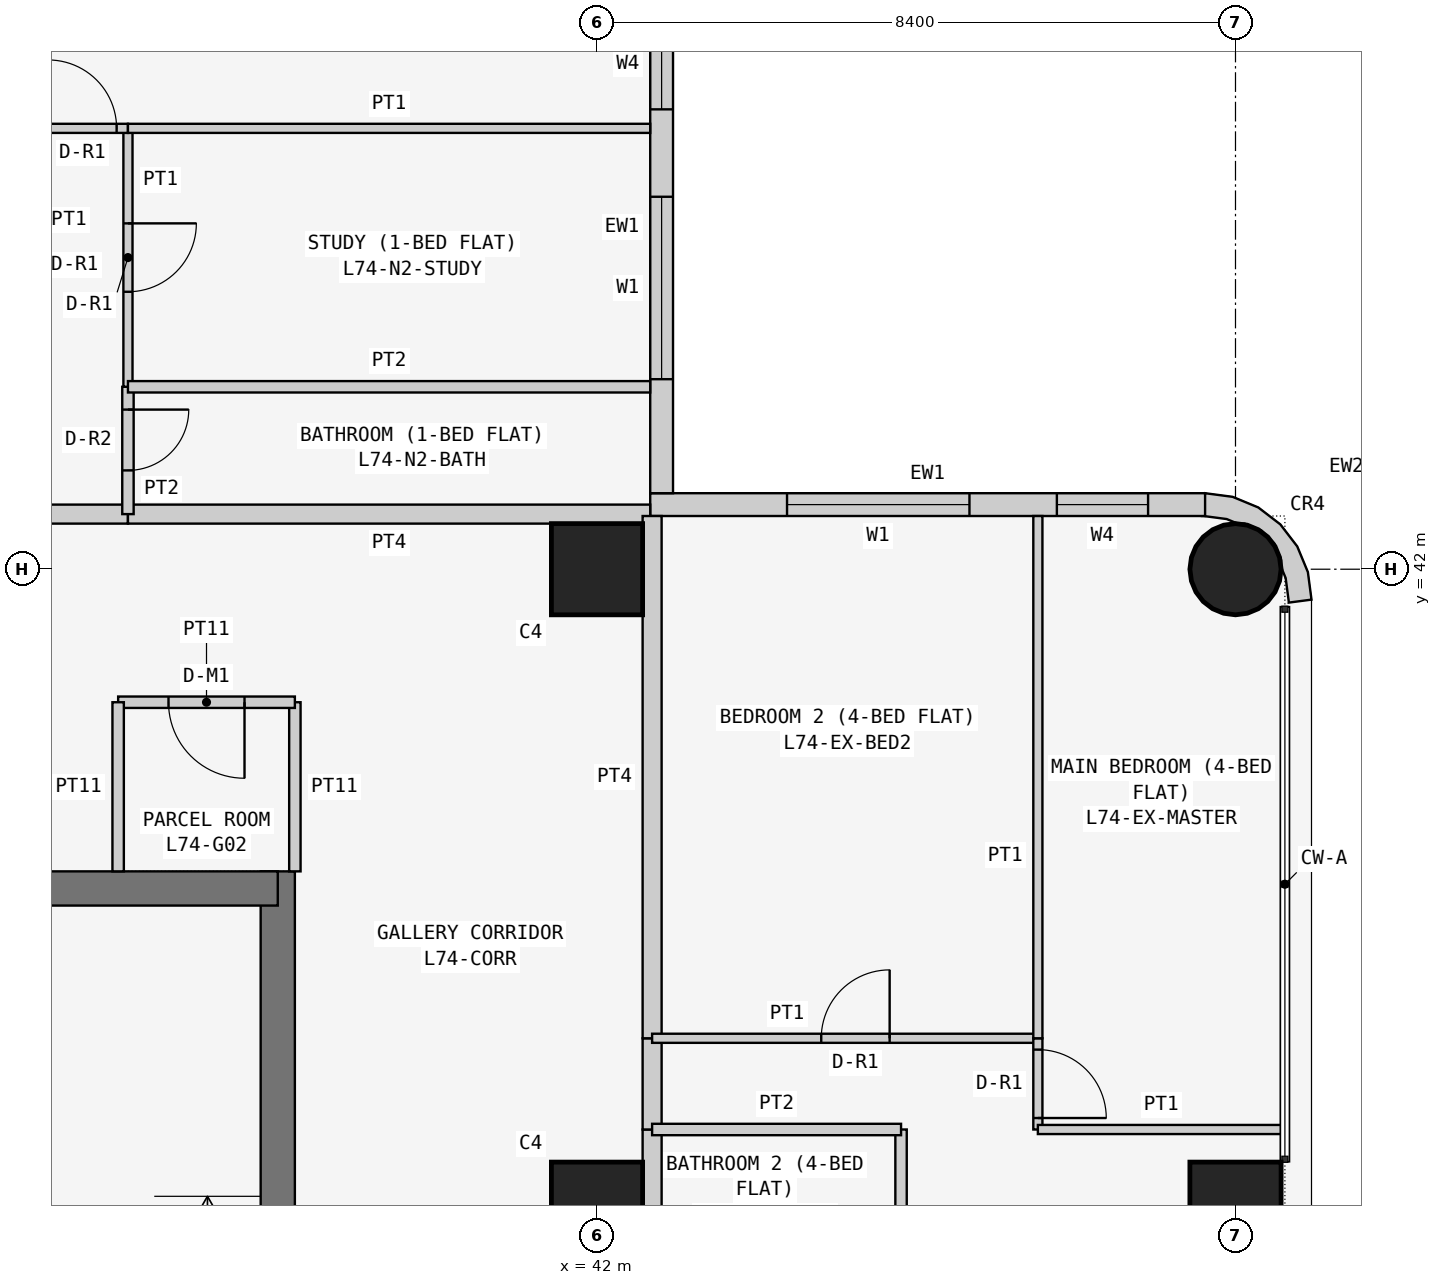
"""IFC4 building model, lengths in metres.
Left out: names, types, materials, properties, quantities, classifications, styles, units other than length and angle.
Written with IfcOpenShell. Run it as: python <this file> out.ifc"""

import sys

from ifc_helpers import new_model, si_unit, direction, frame, frame_2d, origin, origin_2d, place, context, subcontext, project, spatial, polyline, rectangle, circle, outline, extrude, element, fill, save


model = new_model("IFC4")
c1 = context("Model", 3, precision=1e-05, world=origin(), true_north=direction((0.0, 1.0)))
c2 = subcontext(c1, "Body", "Model", "MODEL_VIEW")
j1 = project(units=[si_unit("LENGTHUNIT", "METRE"), si_unit("PLANEANGLEUNIT", "RADIAN")], contexts=[c1])
p1 = place(None, origin())
s1 = spatial("IfcSite", under=j1, at=p1, CompositionType="ELEMENT")
p2 = place(p1, origin())
s2 = spatial("IfcBuilding", under=s1, at=p2, CompositionType="ELEMENT")
p3 = place(p2, frame((0.0, 0.0, 282.9)))
s3 = spatial("IfcBuildingStorey", under=s2, at=p3, CompositionType="ELEMENT", Elevation=282.9)
for number, where, z_axis, x_axis in (
    (1, (42.0, 33.6, 0.0), (0.0, 0.0, 1.0), (1.0, 0.0, 0.0)),
    (2, (42.0, 42.0, 0.0), (0.0, 0.0, 1.0), (1.0, 0.0, 0.0)),
    (3, (50.4, 33.6, 0.0), (0.0, 0.0, 1.0), (1.0, 0.0, 0.0)),
):
    element("IfcColumn", number, at=place(p3, frame(where, z_axis=z_axis, x_axis=x_axis)), inside=s3, PredefinedType="COLUMN", context=c2, shape_type="SweptSolid", body=[
        extrude(rectangle(XDim=1.2, YDim=1.2, at=origin_2d()), origin(), (0.0, 0.0, 1.0), 3.6),
    ])
p4 = place(p3, frame((50.4, 42.0, 0.0), z_axis=(0.0, 0.0, 1.0), x_axis=(1.0, 0.0, 0.0)))
e4 = element("IfcColumn", 4, at=p4, inside=s3, PredefinedType="COLUMN", context=c2, shape_type="SweptSolid", body=[
    extrude(circle(Radius=0.6, at=origin_2d()), origin(), (0.0, 0.0, 1.0), 3.6),
])
p5 = place(p3, frame((37.8, 21.0, 0.0), z_axis=(0.0, 0.0, 1.0), x_axis=(0.0, 1.0, 0.0)))
e5 = element("IfcWall", 5, at=p5, inside=s3, PredefinedType="SHEAR", context=c2, shape_type="SweptSolid", body=[
    extrude(rectangle(XDim=17.025, YDim=0.45, at=frame_2d((8.512, 0.0))), origin(), (0.0, 0.0, 1.0), 3.6),
])
p6 = place(p5, frame((5.2, 0.0, 0.0)))
e6 = element("IfcOpeningElement", 6, at=p6, cuts=e5, PredefinedType="OPENING", context=c2, shape_type="SweptSolid", body=[
    extrude(rectangle(XDim=1.2, YDim=2.1, at=frame_2d((0.6, 1.05))), frame((0.0, 0.235, 0.0), z_axis=(0.0, -1.0, 0.0), x_axis=(1.0, 0.0, 0.0)), (0.0, 0.0, 1.0), 0.47),
])
p7 = place(p3, frame((37.8, 37.8, 0.0), z_axis=(0.0, 0.0, 1.0), x_axis=(-1.0, 0.0, 0.0)))
e7 = element("IfcWall", 7, at=p7, inside=s3, PredefinedType="SHEAR", context=c2, shape_type="SweptSolid", body=[
    extrude(rectangle(XDim=17.025, YDim=0.45, at=frame_2d((8.513, 0.0))), origin(), (0.0, 0.0, 1.0), 3.6),
])
p8 = place(p3, frame((50.0, 42.85, 0.0), z_axis=(0.0, 0.0, 1.0), x_axis=(-1.0, 0.0, 0.0)))
e8 = element("IfcWall", 8, at=p8, inside=s3, PredefinedType="SOLIDWALL", context=c2, shape_type="SweptSolid", body=[
    extrude(rectangle(XDim=7.3, YDim=0.3, at=frame_2d((3.65, 0.0))), origin(), (0.0, 0.0, 1.0), 3.45),
])
p9 = place(p8, frame((3.1, 0.0, 0.9)))
e9 = element("IfcOpeningElement", 9, at=p9, cuts=e8, PredefinedType="OPENING", context=c2, shape_type="SweptSolid", body=[
    extrude(rectangle(XDim=2.4, YDim=1.5, at=frame_2d((1.2, 0.75))), frame((0.0, 0.16, 0.0), z_axis=(0.0, -1.0, 0.0), x_axis=(1.0, 0.0, 0.0)), (0.0, 0.0, 1.0), 0.32),
])
p10 = place(p8, frame((0.75, 0.0, 0.9)))
e10 = element("IfcOpeningElement", 10, at=p10, cuts=e8, PredefinedType="OPENING", context=c2, shape_type="SweptSolid", body=[
    extrude(rectangle(XDim=1.2, YDim=1.5, at=frame_2d((0.6, 0.75))), frame((0.0, 0.16, 0.0), z_axis=(0.0, -1.0, 0.0), x_axis=(1.0, 0.0, 0.0)), (0.0, 0.0, 1.0), 0.32),
])
p11 = place(p3, frame((42.85, 43.0, 0.0), z_axis=(0.0, 0.0, 1.0), x_axis=(0.0, 1.0, 0.0)))
e11 = element("IfcWall", 11, at=p11, inside=s3, PredefinedType="SOLIDWALL", context=c2, shape_type="SweptSolid", body=[
    extrude(rectangle(XDim=7.0, YDim=0.3, at=frame_2d((3.5, 0.0))), origin(), (0.0, 0.0, 1.0), 3.45),
])
p12 = place(p11, frame((1.5, 0.0, 0.9)))
e12 = element("IfcOpeningElement", 12, at=p12, cuts=e11, PredefinedType="OPENING", context=c2, shape_type="SweptSolid", body=[
    extrude(rectangle(XDim=2.4, YDim=1.5, at=frame_2d((1.2, 0.75))), frame((0.0, 0.16, 0.0), z_axis=(0.0, -1.0, 0.0), x_axis=(1.0, 0.0, 0.0)), (0.0, 0.0, 1.0), 0.32),
])
p13 = place(p11, frame((5.05, 0.0, 0.9)))
e13 = element("IfcOpeningElement", 13, at=p13, cuts=e11, PredefinedType="OPENING", context=c2, shape_type="SweptSolid", body=[
    extrude(rectangle(XDim=1.2, YDim=1.5, at=frame_2d((0.6, 0.75))), frame((0.0, 0.16, 0.0), z_axis=(0.0, -1.0, 0.0), x_axis=(1.0, 0.0, 0.0)), (0.0, 0.0, 1.0), 0.32),
])
p14 = place(p3, frame((50.976, 41.638, 0.0), z_axis=(0.0, 0.0, 1.0), x_axis=(0.707106781187, 0.707106781187, 0.0)))
e14 = element("IfcWall", 14, at=p14, inside=s3, PredefinedType="SOLIDWALL", context=c2, shape_type="SweptSolid", body=[
    extrude(outline(polyline([(0.233, 0.114), (0.047, -0.129), (0.033, -0.143), (0.273, -0.327), (0.495, -0.037), (0.635, 0.301), (0.683, 0.663), (0.635, 1.025), (0.495, 1.363), (0.273, 1.653), (0.033, 1.469), (0.047, 1.455), (0.233, 1.212), (0.292, 1.069), (0.358, 1.003), (0.449, 0.782), (0.449, 0.543), (0.358, 0.322), (0.292, 0.257), (0.233, 0.114)])), origin(), (0.0, 0.0, 1.0), 3.45),
])
p15 = place(p3, frame((38.025, 38.025, 0.0), z_axis=(0.0, 0.0, 1.0), x_axis=(0.0, 1.0, 0.0)))
e15 = element("IfcWall", 15, at=p15, inside=s3, PredefinedType="PARTITIONING", context=c2, shape_type="SweptSolid", body=[
    extrude(rectangle(XDim=2.225, YDim=0.15, at=frame_2d((1.113, 0.0))), origin(), (0.0, 0.0, 1.0), 3.45),
])
p16 = place(p3, frame((38.025, 40.25, 0.0), z_axis=(0.0, 0.0, 1.0), x_axis=(-1.0, 0.0, 0.0)))
e16 = element("IfcWall", 16, at=p16, inside=s3, PredefinedType="PARTITIONING", context=c2, shape_type="SweptSolid", body=[
    extrude(rectangle(XDim=2.325, YDim=0.15, at=frame_2d((1.163, 0.0))), origin(), (0.0, 0.0, 1.0), 3.45),
])
p17 = place(p16, frame((0.663, 0.0, 0.0)))
e17 = element("IfcOpeningElement", 17, at=p17, cuts=e16, PredefinedType="OPENING", context=c2, shape_type="SweptSolid", body=[
    extrude(rectangle(XDim=1.0, YDim=2.1, at=frame_2d((0.5, 1.05))), frame((0.0, 0.085, 0.0), z_axis=(0.0, -1.0, 0.0), x_axis=(1.0, 0.0, 0.0)), (0.0, 0.0, 1.0), 0.17),
])
p18 = place(p3, frame((35.7, 40.25, 0.0), z_axis=(0.0, 0.0, 1.0), x_axis=(0.0, -1.0, 0.0)))
e18 = element("IfcWall", 18, at=p18, inside=s3, PredefinedType="PARTITIONING", context=c2, shape_type="SweptSolid", body=[
    extrude(rectangle(XDim=2.225, YDim=0.15, at=frame_2d((1.113, 0.0))), origin(), (0.0, 0.0, 1.0), 3.45),
])
p19 = place(p3, frame((29.4, 42.725, 0.0), z_axis=(0.0, 0.0, 1.0), x_axis=(1.0, 0.0, 0.0)))
e19 = element("IfcWall", 19, at=p19, inside=s3, PredefinedType="PARTITIONING", context=c2, shape_type="SweptSolid", body=[
    extrude(rectangle(XDim=6.429, YDim=0.25, at=frame_2d((3.215, 0.0))), origin(), (0.0, 0.0, 1.0), 3.45),
])
p20 = place(p19, frame((0.5, 0.0, 0.0)))
e20 = element("IfcOpeningElement", 20, at=p20, cuts=e19, PredefinedType="OPENING", context=c2, shape_type="SweptSolid", body=[
    extrude(rectangle(XDim=1.0, YDim=2.1, at=frame_2d((0.5, 1.05))), frame((0.0, 0.135, 0.0), z_axis=(0.0, -1.0, 0.0), x_axis=(1.0, 0.0, 0.0)), (0.0, 0.0, 1.0), 0.27),
])
p21 = place(p3, frame((35.829, 42.725, 0.0), z_axis=(0.0, 0.0, 1.0), x_axis=(1.0, 0.0, 0.0)))
e21 = element("IfcWall", 21, at=p21, inside=s3, PredefinedType="PARTITIONING", context=c2, shape_type="SweptSolid", body=[
    extrude(rectangle(XDim=6.871, YDim=0.25, at=frame_2d((3.436, 0.0))), origin(), (0.0, 0.0, 1.0), 3.45),
])
p22 = place(p3, frame((42.725, 34.629, 0.0), z_axis=(0.0, 0.0, 1.0), x_axis=(0.0, -1.0, 0.0)))
e22 = element("IfcWall", 22, at=p22, inside=s3, PredefinedType="PARTITIONING", context=c2, shape_type="SweptSolid", body=[
    extrude(rectangle(XDim=2.629, YDim=0.25, at=frame_2d((1.314, 0.0))), origin(), (0.0, 0.0, 1.0), 3.45),
])
p23 = place(p3, frame((42.725, 35.829, 0.0), z_axis=(0.0, 0.0, 1.0), x_axis=(0.0, -1.0, 0.0)))
e23 = element("IfcWall", 23, at=p23, inside=s3, PredefinedType="PARTITIONING", context=c2, shape_type="SweptSolid", body=[
    extrude(rectangle(XDim=1.2, YDim=0.25, at=frame_2d((0.6, 0.0))), origin(), (0.0, 0.0, 1.0), 3.45),
])
p24 = place(p3, frame((42.725, 42.7, 0.0), z_axis=(0.0, 0.0, 1.0), x_axis=(0.0, -1.0, 0.0)))
e24 = element("IfcWall", 24, at=p24, inside=s3, PredefinedType="PARTITIONING", context=c2, shape_type="SweptSolid", body=[
    extrude(rectangle(XDim=6.871, YDim=0.25, at=frame_2d((3.436, 0.0))), origin(), (0.0, 0.0, 1.0), 3.45),
])
p25 = place(p3, frame((35.829, 44.4, 0.0), z_axis=(0.0, 0.0, 1.0), x_axis=(0.0, -1.0, 0.0)))
e25 = element("IfcWall", 25, at=p25, inside=s3, PredefinedType="PARTITIONING", context=c2, shape_type="SweptSolid", body=[
    extrude(rectangle(XDim=1.675, YDim=0.15, at=frame_2d((0.837, 0.0))), origin(), (0.0, 0.0, 1.0), 3.45),
])
p26 = place(p25, frame((0.3, 0.0, 0.0)))
e26 = element("IfcOpeningElement", 26, at=p26, cuts=e25, PredefinedType="OPENING", context=c2, shape_type="SweptSolid", body=[
    extrude(rectangle(XDim=0.8, YDim=2.1, at=frame_2d((0.4, 1.05))), frame((0.0, 0.085, 0.0), z_axis=(0.0, -1.0, 0.0), x_axis=(1.0, 0.0, 0.0)), (0.0, 0.0, 1.0), 0.17),
])
p27 = place(p3, frame((35.829, 47.8, 0.0), z_axis=(0.0, 0.0, 1.0), x_axis=(0.0, -1.0, 0.0)))
e27 = element("IfcWall", 27, at=p27, inside=s3, PredefinedType="PARTITIONING", context=c2, shape_type="SweptSolid", body=[
    extrude(rectangle(XDim=3.4, YDim=0.12, at=frame_2d((1.7, 0.0))), origin(), (0.0, 0.0, 1.0), 3.45),
])
p28 = place(p27, frame((1.25, 0.0, 0.0)))
e28 = element("IfcOpeningElement", 28, at=p28, cuts=e27, PredefinedType="OPENING", context=c2, shape_type="SweptSolid", body=[
    extrude(rectangle(XDim=0.9, YDim=2.1, at=frame_2d((0.45, 1.05))), frame((0.0, 0.07, 0.0), z_axis=(0.0, -1.0, 0.0), x_axis=(1.0, 0.0, 0.0)), (0.0, 0.0, 1.0), 0.14),
])
p29 = place(p3, frame((34.629, 47.8, 0.0), z_axis=(0.0, 0.0, 1.0), x_axis=(1.0, 0.0, 0.0)))
e29 = element("IfcWall", 29, at=p29, inside=s3, PredefinedType="PARTITIONING", context=c2, shape_type="SweptSolid", body=[
    extrude(rectangle(XDim=1.2, YDim=0.12, at=frame_2d((0.6, 0.0))), origin(), (0.0, 0.0, 1.0), 3.45),
])
p30 = place(p29, frame((0.151, 0.0, 0.0)))
e30 = element("IfcOpeningElement", 30, at=p30, cuts=e29, PredefinedType="OPENING", context=c2, shape_type="SweptSolid", body=[
    extrude(rectangle(XDim=0.9, YDim=2.1, at=frame_2d((0.45, 1.05))), frame((0.0, 0.07, 0.0), z_axis=(0.0, -1.0, 0.0), x_axis=(1.0, 0.0, 0.0)), (0.0, 0.0, 1.0), 0.14),
])
p31 = place(p3, frame((35.829, 44.4, 0.0), z_axis=(0.0, 0.0, 1.0), x_axis=(1.0, 0.0, 0.0)))
e31 = element("IfcWall", 31, at=p31, inside=s3, PredefinedType="PARTITIONING", context=c2, shape_type="SweptSolid", body=[
    extrude(rectangle(XDim=6.871, YDim=0.15, at=frame_2d((3.436, 0.0))), origin(), (0.0, 0.0, 1.0), 3.45),
])
p32 = place(p3, frame((35.829, 47.8, 0.0), z_axis=(0.0, 0.0, 1.0), x_axis=(1.0, 0.0, 0.0)))
e32 = element("IfcWall", 32, at=p32, inside=s3, PredefinedType="PARTITIONING", context=c2, shape_type="SweptSolid", body=[
    extrude(rectangle(XDim=6.871, YDim=0.12, at=frame_2d((3.436, 0.0))), origin(), (0.0, 0.0, 1.0), 3.45),
])
p33 = place(p3, frame((46.0, 32.0, 0.0), z_axis=(0.0, 0.0, 1.0), x_axis=(0.0, 1.0, 0.0)))
e33 = element("IfcWall", 33, at=p33, inside=s3, PredefinedType="PARTITIONING", context=c2, shape_type="SweptSolid", body=[
    extrude(rectangle(XDim=2.629, YDim=0.15, at=frame_2d((1.314, 0.0))), origin(), (0.0, 0.0, 1.0), 3.45),
])
p34 = place(p3, frame((46.0, 34.629, 0.0), z_axis=(0.0, 0.0, 1.0), x_axis=(-1.0, 0.0, 0.0)))
e34 = element("IfcWall", 34, at=p34, inside=s3, PredefinedType="PARTITIONING", context=c2, shape_type="SweptSolid", body=[
    extrude(rectangle(XDim=3.275, YDim=0.15, at=frame_2d((1.637, 0.0))), origin(), (0.0, 0.0, 1.0), 3.45),
])
p35 = place(p3, frame((42.725, 35.829, 0.0), z_axis=(0.0, 0.0, 1.0), x_axis=(1.0, 0.0, 0.0)))
e35 = element("IfcWall", 35, at=p35, inside=s3, PredefinedType="PARTITIONING", context=c2, shape_type="SweptSolid", body=[
    extrude(rectangle(XDim=5.075, YDim=0.12, at=frame_2d((2.538, 0.0))), origin(), (0.0, 0.0, 1.0), 3.45),
])
p36 = place(p35, frame((2.225, 0.0, 0.0)))
e36 = element("IfcOpeningElement", 36, at=p36, cuts=e35, PredefinedType="OPENING", context=c2, shape_type="SweptSolid", body=[
    extrude(rectangle(XDim=0.9, YDim=2.1, at=frame_2d((0.45, 1.05))), frame((0.0, 0.07, 0.0), z_axis=(0.0, -1.0, 0.0), x_axis=(1.0, 0.0, 0.0)), (0.0, 0.0, 1.0), 0.14),
])
p37 = place(p3, frame((47.8, 35.829, 0.0), z_axis=(0.0, 0.0, 1.0), x_axis=(0.0, -1.0, 0.0)))
e37 = element("IfcWall", 37, at=p37, inside=s3, PredefinedType="PARTITIONING", context=c2, shape_type="SweptSolid", body=[
    extrude(rectangle(XDim=1.2, YDim=0.12, at=frame_2d((0.6, 0.0))), origin(), (0.0, 0.0, 1.0), 3.45),
])
p38 = place(p37, frame((0.149, 0.0, 0.0)))
e38 = element("IfcOpeningElement", 38, at=p38, cuts=e37, PredefinedType="OPENING", context=c2, shape_type="SweptSolid", body=[
    extrude(rectangle(XDim=0.9, YDim=2.1, at=frame_2d((0.45, 1.05))), frame((0.0, 0.07, 0.0), z_axis=(0.0, -1.0, 0.0), x_axis=(1.0, 0.0, 0.0)), (0.0, 0.0, 1.0), 0.14),
])
p39 = place(p3, frame((47.8, 34.629, 0.0), z_axis=(0.0, 0.0, 1.0), x_axis=(1.0, 0.0, 0.0)))
e39 = element("IfcWall", 39, at=p39, inside=s3, PredefinedType="PARTITIONING", context=c2, shape_type="SweptSolid", body=[
    extrude(rectangle(XDim=3.25, YDim=0.12, at=frame_2d((1.625, 0.0))), origin(), (0.0, 0.0, 1.0), 3.45),
])
p40 = place(p3, frame((47.8, 35.829, 0.0), z_axis=(0.0, 0.0, 1.0), x_axis=(0.0, 1.0, 0.0)))
e40 = element("IfcWall", 40, at=p40, inside=s3, PredefinedType="PARTITIONING", context=c2, shape_type="SweptSolid", body=[
    extrude(rectangle(XDim=6.871, YDim=0.12, at=frame_2d((3.436, 0.0))), origin(), (0.0, 0.0, 1.0), 3.45),
])
p41 = place(p12, origin())
e41 = element("IfcWindow", 41, at=p41, inside=s3, PartitioningType="SINGLE_PANEL", PredefinedType="WINDOW", context=c2, shape_type="SweptSolid", body=[
    extrude(rectangle(XDim=2.4, YDim=1.5, at=frame_2d((1.2, 0.75))), frame((0.0, 0.03, 0.0), z_axis=(0.0, -1.0, 0.0), x_axis=(1.0, 0.0, 0.0)), (0.0, 0.0, 1.0), 0.06),
])
fill(e12, e41)
p42 = place(p13, origin())
e42 = element("IfcWindow", 42, at=p42, inside=s3, PartitioningType="SINGLE_PANEL", PredefinedType="WINDOW", context=c2, shape_type="SweptSolid", body=[
    extrude(rectangle(XDim=1.2, YDim=1.5, at=frame_2d((0.6, 0.75))), frame((0.0, 0.03, 0.0), z_axis=(0.0, -1.0, 0.0), x_axis=(1.0, 0.0, 0.0)), (0.0, 0.0, 1.0), 0.06),
])
fill(e13, e42)
p43 = place(p9, origin())
e43 = element("IfcWindow", 43, at=p43, inside=s3, PartitioningType="SINGLE_PANEL", PredefinedType="WINDOW", context=c2, shape_type="SweptSolid", body=[
    extrude(rectangle(XDim=2.4, YDim=1.5, at=frame_2d((1.2, 0.75))), frame((0.0, 0.03, 0.0), z_axis=(0.0, -1.0, 0.0), x_axis=(1.0, 0.0, 0.0)), (0.0, 0.0, 1.0), 0.06),
])
fill(e9, e43)
p44 = place(p10, origin())
e44 = element("IfcWindow", 44, at=p44, inside=s3, PartitioningType="SINGLE_PANEL", PredefinedType="WINDOW", context=c2, shape_type="SweptSolid", body=[
    extrude(rectangle(XDim=1.2, YDim=1.5, at=frame_2d((0.6, 0.75))), frame((0.0, 0.03, 0.0), z_axis=(0.0, -1.0, 0.0), x_axis=(1.0, 0.0, 0.0)), (0.0, 0.0, 1.0), 0.06),
])
fill(e10, e44)
p45 = place(p17, origin())
e45 = element("IfcDoor", 45, at=p45, inside=s3, OperationType="SINGLE_SWING_LEFT", PredefinedType="DOOR", context=c2, shape_type="SweptSolid", body=[
    extrude(rectangle(XDim=1.0, YDim=2.1, at=frame_2d((0.5, 1.05))), frame((0.0, 0.025, 0.0), z_axis=(0.0, -1.0, 0.0), x_axis=(1.0, 0.0, 0.0)), (0.0, 0.0, 1.0), 0.05),
])
fill(e17, e45)
p46 = place(p26, origin())
e46 = element("IfcDoor", 46, at=p46, inside=s3, OperationType="SINGLE_SWING_LEFT", PredefinedType="DOOR", context=c2, shape_type="SweptSolid", body=[
    extrude(rectangle(XDim=0.8, YDim=2.1, at=frame_2d((0.4, 1.05))), frame((0.0, 0.025, 0.0), z_axis=(0.0, -1.0, 0.0), x_axis=(1.0, 0.0, 0.0)), (0.0, 0.0, 1.0), 0.05),
])
fill(e26, e46)
p47 = place(p28, origin())
e47 = element("IfcDoor", 47, at=p47, inside=s3, OperationType="SINGLE_SWING_LEFT", PredefinedType="DOOR", context=c2, shape_type="SweptSolid", body=[
    extrude(rectangle(XDim=0.9, YDim=2.1, at=frame_2d((0.45, 1.05))), frame((0.0, 0.025, 0.0), z_axis=(0.0, -1.0, 0.0), x_axis=(1.0, 0.0, 0.0)), (0.0, 0.0, 1.0), 0.05),
])
fill(e28, e47)
p48 = place(p30, origin())
e48 = element("IfcDoor", 48, at=p48, inside=s3, OperationType="SINGLE_SWING_LEFT", PredefinedType="DOOR", context=c2, shape_type="SweptSolid", body=[
    extrude(rectangle(XDim=0.9, YDim=2.1, at=frame_2d((0.45, 1.05))), frame((0.0, 0.025, 0.0), z_axis=(0.0, -1.0, 0.0), x_axis=(1.0, 0.0, 0.0)), (0.0, 0.0, 1.0), 0.05),
])
fill(e30, e48)
p49 = place(p36, origin())
e49 = element("IfcDoor", 49, at=p49, inside=s3, OperationType="SINGLE_SWING_RIGHT", PredefinedType="DOOR", context=c2, shape_type="SweptSolid", body=[
    extrude(rectangle(XDim=0.9, YDim=2.1, at=frame_2d((0.45, 1.05))), frame((0.0, 0.025, 0.0), z_axis=(0.0, -1.0, 0.0), x_axis=(1.0, 0.0, 0.0)), (0.0, 0.0, 1.0), 0.05),
])
fill(e36, e49)
p50 = place(p38, origin())
e50 = element("IfcDoor", 50, at=p50, inside=s3, OperationType="SINGLE_SWING_RIGHT", PredefinedType="DOOR", context=c2, shape_type="SweptSolid", body=[
    extrude(rectangle(XDim=0.9, YDim=2.1, at=frame_2d((0.45, 1.05))), frame((0.0, 0.025, 0.0), z_axis=(0.0, -1.0, 0.0), x_axis=(1.0, 0.0, 0.0)), (0.0, 0.0, 1.0), 0.05),
])
fill(e38, e50)
save(model, sys.argv[1])
